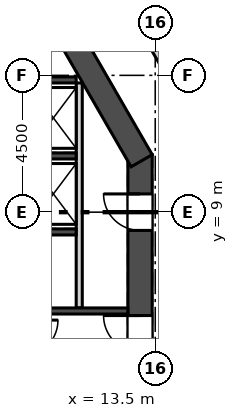
"""IFC4 building model, lengths in metres.
Left out: names, types, materials, properties, quantities, classifications, styles, units other than length and angle.
Written with IfcOpenShell. Run it as: python <this file> out.ifc"""

import sys

from ifc_helpers import new_model, si_unit, direction, frame, frame_2d, origin, place, context, subcontext, project, spatial, rectangle, extrude, element, fill, save


model = new_model("IFC4")
c1 = context("Model", 3, precision=1e-05, world=origin(), true_north=direction((0.0, 1.0)))
c2 = subcontext(c1, "Body", "Model", "MODEL_VIEW")
j1 = project(units=[si_unit("LENGTHUNIT", "METRE"), si_unit("PLANEANGLEUNIT", "RADIAN")], contexts=[c1])
p1 = place(None, origin())
s1 = spatial("IfcSite", under=j1, at=p1, CompositionType="ELEMENT")
p2 = place(p1, origin())
s2 = spatial("IfcBuilding", under=s1, at=p2, CompositionType="ELEMENT")
p3 = place(p2, frame((0.0, 0.0, 304.5)))
s3 = spatial("IfcBuildingStorey", under=s2, at=p3, CompositionType="ELEMENT", Elevation=304.5)
p4 = place(p3, frame((13.0, 1.45, 0.0), z_axis=(0.0, 0.0, 1.0), x_axis=(0.0, 1.0, 0.0)))
e1 = element("IfcWall", 1, at=p4, inside=s3, PredefinedType="SHEAR", context=c2, shape_type="SweptSolid", body=[
    extrude(rectangle(XDim=9.442, YDim=0.8, at=frame_2d((4.721, 0.0))), origin(), (0.0, 0.0, 1.0), 5.4),
])
p5 = place(p4, frame((2.95, 0.0, 0.0)))
e2 = element("IfcOpeningElement", 2, at=p5, cuts=e1, PredefinedType="OPENING", context=c2, shape_type="SweptSolid", body=[
    extrude(rectangle(XDim=1.2, YDim=2.1, at=frame_2d((0.6, 1.05))), frame((0.0, 0.41, 0.0), z_axis=(0.0, -1.0, 0.0), x_axis=(1.0, 0.0, 0.0)), (0.0, 0.0, 1.0), 0.82),
])
p6 = place(p4, frame((6.95, 0.0, 0.0)))
e3 = element("IfcOpeningElement", 3, at=p6, cuts=e1, PredefinedType="OPENING", context=c2, shape_type="SweptSolid", body=[
    extrude(rectangle(XDim=1.2, YDim=2.1, at=frame_2d((0.6, 1.05))), frame((0.0, 0.41, 0.0), z_axis=(0.0, -1.0, 0.0), x_axis=(1.0, 0.0, 0.0)), (0.0, 0.0, 1.0), 0.82),
])
p7 = place(p3, frame((13.054, 10.692, 0.0), z_axis=(0.0, 0.0, 1.0), x_axis=(-0.500015780397, 0.866016292776, 0.0)))
e4 = element("IfcWall", 4, at=p7, inside=s3, PredefinedType="SHEAR", context=c2, shape_type="SweptSolid", body=[
    extrude(rectangle(XDim=8.67, YDim=0.8, at=frame_2d((4.335, 0.0))), origin(), (0.0, 0.0, 1.0), 5.4),
])
p8 = place(p3, frame((24.905, 7.709, 0.0), z_axis=(0.0, 0.0, 1.0), x_axis=(-0.50000128873, 0.866024659735, 0.0)))
e5 = element("IfcWall", 5, at=p8, inside=s3, PredefinedType="SOLIDWALL", context=c2, shape_type="SweptSolid", body=[
    extrude(rectangle(XDim=41.104, YDim=0.34, at=frame_2d((20.552, 0.0))), origin(), (0.0, 0.0, 1.0), 5.0),
])
p9 = place(p8, frame((3.776, 0.0, 0.9)))
e6 = element("IfcOpeningElement", 6, at=p9, cuts=e5, PredefinedType="OPENING", context=c2, shape_type="SweptSolid", body=[
    extrude(rectangle(XDim=1.885, YDim=3.0, at=frame_2d((0.942, 1.5))), frame((0.0, 0.18, 0.0), z_axis=(0.0, -1.0, 0.0), x_axis=(1.0, 0.0, 0.0)), (0.0, 0.0, 1.0), 0.36),
])
p10 = place(p8, frame((6.776, 0.0, 0.9)))
e7 = element("IfcOpeningElement", 7, at=p10, cuts=e5, PredefinedType="OPENING", context=c2, shape_type="SweptSolid", body=[
    extrude(rectangle(XDim=1.885, YDim=3.0, at=frame_2d((0.942, 1.5))), frame((0.0, 0.18, 0.0), z_axis=(0.0, -1.0, 0.0), x_axis=(1.0, 0.0, 0.0)), (0.0, 0.0, 1.0), 0.36),
])
p11 = place(p8, frame((9.776, 0.0, 0.9)))
e8 = element("IfcOpeningElement", 8, at=p11, cuts=e5, PredefinedType="OPENING", context=c2, shape_type="SweptSolid", body=[
    extrude(rectangle(XDim=1.885, YDim=3.0, at=frame_2d((0.942, 1.5))), frame((0.0, 0.18, 0.0), z_axis=(0.0, -1.0, 0.0), x_axis=(1.0, 0.0, 0.0)), (0.0, 0.0, 1.0), 0.36),
])
p12 = place(p8, frame((12.776, 0.0, 0.9)))
e9 = element("IfcOpeningElement", 9, at=p12, cuts=e5, PredefinedType="OPENING", context=c2, shape_type="SweptSolid", body=[
    extrude(rectangle(XDim=1.885, YDim=3.0, at=frame_2d((0.942, 1.5))), frame((0.0, 0.18, 0.0), z_axis=(0.0, -1.0, 0.0), x_axis=(1.0, 0.0, 0.0)), (0.0, 0.0, 1.0), 0.36),
])
p13 = place(p8, frame((15.776, 0.0, 0.9)))
e10 = element("IfcOpeningElement", 10, at=p13, cuts=e5, PredefinedType="OPENING", context=c2, shape_type="SweptSolid", body=[
    extrude(rectangle(XDim=1.885, YDim=3.0, at=frame_2d((0.942, 1.5))), frame((0.0, 0.18, 0.0), z_axis=(0.0, -1.0, 0.0), x_axis=(1.0, 0.0, 0.0)), (0.0, 0.0, 1.0), 0.36),
])
p14 = place(p8, frame((18.776, 0.0, 0.9)))
e11 = element("IfcOpeningElement", 11, at=p14, cuts=e5, PredefinedType="OPENING", context=c2, shape_type="SweptSolid", body=[
    extrude(rectangle(XDim=1.885, YDim=3.0, at=frame_2d((0.942, 1.5))), frame((0.0, 0.18, 0.0), z_axis=(0.0, -1.0, 0.0), x_axis=(1.0, 0.0, 0.0)), (0.0, 0.0, 1.0), 0.36),
])
p15 = place(p8, frame((21.776, 0.0, 0.9)))
e12 = element("IfcOpeningElement", 12, at=p15, cuts=e5, PredefinedType="OPENING", context=c2, shape_type="SweptSolid", body=[
    extrude(rectangle(XDim=1.885, YDim=3.0, at=frame_2d((0.942, 1.5))), frame((0.0, 0.18, 0.0), z_axis=(0.0, -1.0, 0.0), x_axis=(1.0, 0.0, 0.0)), (0.0, 0.0, 1.0), 0.36),
])
p16 = place(p8, frame((24.776, 0.0, 0.9)))
e13 = element("IfcOpeningElement", 13, at=p16, cuts=e5, PredefinedType="OPENING", context=c2, shape_type="SweptSolid", body=[
    extrude(rectangle(XDim=1.885, YDim=3.0, at=frame_2d((0.942, 1.5))), frame((0.0, 0.18, 0.0), z_axis=(0.0, -1.0, 0.0), x_axis=(1.0, 0.0, 0.0)), (0.0, 0.0, 1.0), 0.36),
])
p17 = place(p8, frame((27.776, 0.0, 0.9)))
e14 = element("IfcOpeningElement", 14, at=p17, cuts=e5, PredefinedType="OPENING", context=c2, shape_type="SweptSolid", body=[
    extrude(rectangle(XDim=1.885, YDim=3.0, at=frame_2d((0.942, 1.5))), frame((0.0, 0.18, 0.0), z_axis=(0.0, -1.0, 0.0), x_axis=(1.0, 0.0, 0.0)), (0.0, 0.0, 1.0), 0.36),
])
p18 = place(p8, frame((30.776, 0.0, 0.9)))
e15 = element("IfcOpeningElement", 15, at=p18, cuts=e5, PredefinedType="OPENING", context=c2, shape_type="SweptSolid", body=[
    extrude(rectangle(XDim=1.885, YDim=3.0, at=frame_2d((0.942, 1.5))), frame((0.0, 0.18, 0.0), z_axis=(0.0, -1.0, 0.0), x_axis=(1.0, 0.0, 0.0)), (0.0, 0.0, 1.0), 0.36),
])
p19 = place(p8, frame((33.776, 0.0, 0.9)))
e16 = element("IfcOpeningElement", 16, at=p19, cuts=e5, PredefinedType="OPENING", context=c2, shape_type="SweptSolid", body=[
    extrude(rectangle(XDim=1.885, YDim=3.0, at=frame_2d((0.942, 1.5))), frame((0.0, 0.18, 0.0), z_axis=(0.0, -1.0, 0.0), x_axis=(1.0, 0.0, 0.0)), (0.0, 0.0, 1.0), 0.36),
])
p20 = place(p8, frame((36.776, 0.0, 0.9)))
e17 = element("IfcOpeningElement", 17, at=p20, cuts=e5, PredefinedType="OPENING", context=c2, shape_type="SweptSolid", body=[
    extrude(rectangle(XDim=1.885, YDim=3.0, at=frame_2d((0.942, 1.5))), frame((0.0, 0.18, 0.0), z_axis=(0.0, -1.0, 0.0), x_axis=(1.0, 0.0, 0.0)), (0.0, 0.0, 1.0), 0.36),
])
p21 = place(p3, frame((11.0, 5.85, 0.0), z_axis=(0.0, 0.0, 1.0), x_axis=(0.0, 1.0, 0.0)))
e18 = element("IfcWall", 18, at=p21, inside=s3, PredefinedType="SOLIDWALL", context=c2, shape_type="SweptSolid", body=[
    extrude(rectangle(XDim=7.4, YDim=0.2, at=frame_2d((3.7, 0.0))), origin(), (0.0, 0.0, 1.0), 5.0),
])
p22 = place(p3, frame((8.9, 8.35, -0.4), z_axis=(0.0, 0.0, 1.0), x_axis=(1.0, 0.0, 0.0)))
e19 = element("IfcWall", 19, at=p22, inside=s3, PredefinedType="SOLIDWALL", context=c2, shape_type="SweptSolid", body=[
    extrude(rectangle(XDim=2.0, YDim=0.2, at=frame_2d((1.0, 0.0))), origin(), (0.0, 0.0, 1.0), 5.4),
])
p23 = place(p3, frame((1.2, 5.75, -0.4), z_axis=(0.0, 0.0, 1.0), x_axis=(1.0, 0.0, 0.0)))
e20 = element("IfcWall", 20, at=p23, inside=s3, PredefinedType="SOLIDWALL", context=c2, shape_type="SweptSolid", body=[
    extrude(rectangle(XDim=11.4, YDim=0.2, at=frame_2d((5.7, 0.0))), origin(), (0.0, 0.0, 1.0), 5.4),
])
for number, where, z_axis, x_axis in (
    (21, (8.9, 10.85, -0.4), (0.0, 0.0, 1.0), (1.0, 0.0, 0.0)),
    (22, (8.9, 13.35, -0.4), (0.0, 0.0, 1.0), (1.0, 0.0, 0.0)),
):
    element("IfcWall", number, at=place(p3, frame(where, z_axis=z_axis, x_axis=x_axis)), inside=s3, PredefinedType="SOLIDWALL", context=c2, shape_type="SweptSolid", body=[
        extrude(rectangle(XDim=2.0, YDim=0.2, at=frame_2d((1.0, 0.0))), origin(), (0.0, 0.0, 1.0), 5.4),
    ])
p24 = place(p3, frame((10.235, 20.074, 0.0), z_axis=(0.0, 0.0, 1.0), x_axis=(0.499992751826, -0.866029588479, 0.0)))
e23 = element("IfcWall", 23, at=p24, inside=s3, PredefinedType="SOLIDWALL", context=c2, shape_type="SweptSolid", body=[
    extrude(rectangle(XDim=9.825, YDim=0.3, at=frame_2d((4.913, 0.0))), origin(), (0.0, 0.0, 1.0), 5.0),
])
p25 = place(p5, origin())
e24 = element("IfcDoor", 24, at=p25, inside=s3, OperationType="SINGLE_SWING_RIGHT", PredefinedType="DOOR", context=c2, shape_type="SweptSolid", body=[
    extrude(rectangle(XDim=1.2, YDim=2.1, at=frame_2d((0.6, 1.05))), frame((0.0, 0.025, 0.0), z_axis=(0.0, -1.0, 0.0), x_axis=(1.0, 0.0, 0.0)), (0.0, 0.0, 1.0), 0.05),
])
fill(e2, e24)
p26 = place(p6, origin())
e25 = element("IfcDoor", 25, at=p26, inside=s3, OperationType="SINGLE_SWING_RIGHT", PredefinedType="DOOR", context=c2, shape_type="SweptSolid", body=[
    extrude(rectangle(XDim=1.2, YDim=2.1, at=frame_2d((0.6, 1.05))), frame((0.0, 0.025, 0.0), z_axis=(0.0, -1.0, 0.0), x_axis=(1.0, 0.0, 0.0)), (0.0, 0.0, 1.0), 0.05),
])
fill(e3, e25)
save(model, sys.argv[1])
